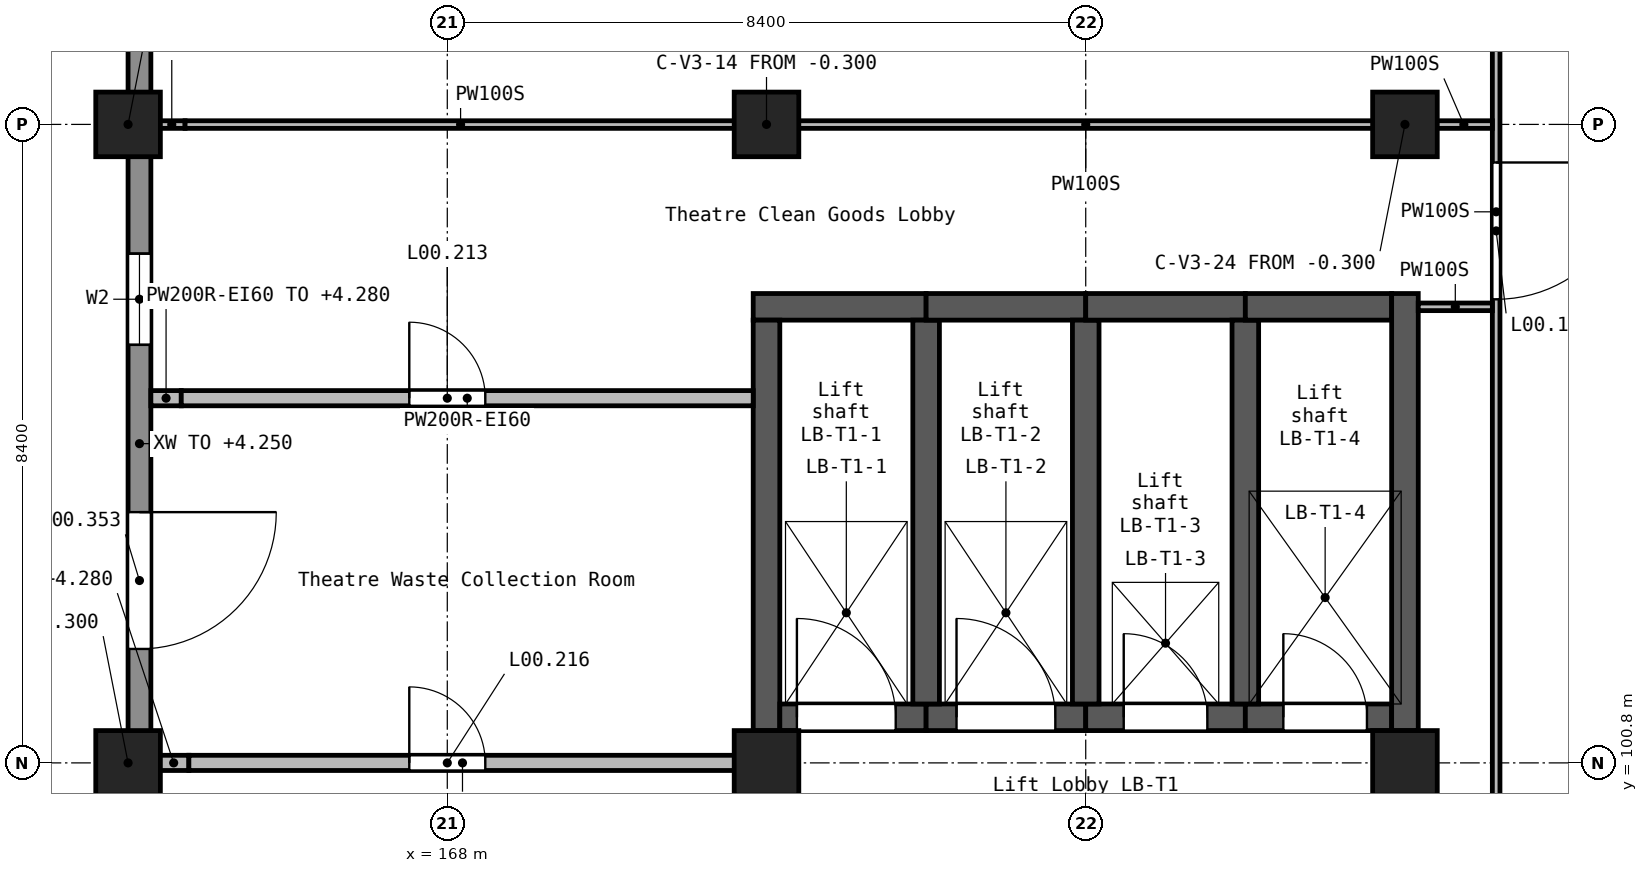
"""IFC4 building model, lengths in metres.
Left out: names, types, materials, properties, quantities, classifications, styles, units other than length and angle.
Written with IfcOpenShell. Run it as: python <this file> out.ifc"""

import sys

from ifc_helpers import new_model, si_unit, direction, frame, frame_2d, origin, origin_2d, place, context, subcontext, project, spatial, rectangle, extrude, element, fill, save


model = new_model("IFC4")
c1 = context("Model", 3, precision=1e-05, world=origin(), true_north=direction((0.0, 1.0)))
c2 = subcontext(c1, "Body", "Model", "MODEL_VIEW")
j1 = project(units=[si_unit("LENGTHUNIT", "METRE"), si_unit("PLANEANGLEUNIT", "RADIAN")], contexts=[c1])
p1 = place(None, origin())
s1 = spatial("IfcSite", under=j1, at=p1, CompositionType="ELEMENT")
p2 = place(p1, origin())
s2 = spatial("IfcBuilding", under=s1, at=p2, CompositionType="ELEMENT")
p3 = place(p2, origin())
s3 = spatial("IfcBuildingStorey", under=s2, at=p3, CompositionType="ELEMENT", Elevation=0.0)
for number, where, z_axis, x_axis in (
    (1, (163.8, 100.8, -0.3), (0.0, 0.0, 1.0), (1.0, 0.0, 0.0)),
    (2, (163.8, 109.2, -0.3), (0.0, 0.0, 1.0), (1.0, 0.0, 0.0)),
    (3, (172.2, 100.8, -0.3), (0.0, 0.0, 1.0), (1.0, 0.0, 0.0)),
    (4, (172.2, 109.2, -0.3), (0.0, 0.0, 1.0), (1.0, 0.0, 0.0)),
    (5, (180.6, 100.8, -0.3), (0.0, 0.0, 1.0), (1.0, 0.0, 0.0)),
    (6, (180.6, 109.2, -0.3), (0.0, 0.0, 1.0), (1.0, 0.0, 0.0)),
):
    element("IfcColumn", number, at=place(p3, frame(where, z_axis=z_axis, x_axis=x_axis)), inside=s3, PredefinedType="COLUMN", context=c2, shape_type="SweptSolid", body=[
        extrude(rectangle(XDim=0.85, YDim=0.85, at=origin_2d()), origin(), (0.0, 0.0, 1.0), 5.7),
    ])
p4 = place(p3, frame((172.025, 106.8, -0.3), z_axis=(0.0, 0.0, 1.0), x_axis=(1.0, 0.0, 0.0)))
e7 = element("IfcWall", 7, at=p4, inside=s3, PredefinedType="SHEAR", context=c2, shape_type="SweptSolid", body=[
    extrude(rectangle(XDim=2.275, YDim=0.35, at=frame_2d((1.138, 0.0))), origin(), (0.0, 0.0, 1.0), 5.7),
])
p5 = place(p3, frame((172.2, 101.225, -0.3), z_axis=(0.0, 0.0, 1.0), x_axis=(0.0, 1.0, 0.0)))
e8 = element("IfcWall", 8, at=p5, inside=s3, PredefinedType="SHEAR", context=c2, shape_type="SweptSolid", body=[
    extrude(rectangle(XDim=5.4, YDim=0.35, at=frame_2d((2.7, 0.0))), origin(), (0.0, 0.0, 1.0), 5.7),
])
p6 = place(p3, frame((172.375, 101.4, -0.3), z_axis=(0.0, 0.0, 1.0), x_axis=(1.0, 0.0, 0.0)))
e9 = element("IfcWall", 9, at=p6, inside=s3, PredefinedType="SHEAR", context=c2, shape_type="SweptSolid", body=[
    extrude(rectangle(XDim=1.925, YDim=0.35, at=frame_2d((0.962, 0.0))), origin(), (0.0, 0.0, 1.0), 5.7),
])
p7 = place(p6, frame((0.225, 0.0, 0.3)))
e10 = element("IfcOpeningElement", 10, at=p7, cuts=e9, PredefinedType="OPENING", context=c2, shape_type="SweptSolid", body=[
    extrude(rectangle(XDim=1.3, YDim=2.1, at=frame_2d((0.65, 1.05))), frame((0.0, 0.185, 0.0), z_axis=(0.0, -1.0, 0.0), x_axis=(1.0, 0.0, 0.0)), (0.0, 0.0, 1.0), 0.37),
])
p8 = place(p3, frame((174.3, 101.4, -0.3), z_axis=(0.0, 0.0, 1.0), x_axis=(1.0, 0.0, 0.0)))
e11 = element("IfcWall", 11, at=p8, inside=s3, PredefinedType="SHEAR", context=c2, shape_type="SweptSolid", body=[
    extrude(rectangle(XDim=2.1, YDim=0.35, at=frame_2d((1.05, 0.0))), origin(), (0.0, 0.0, 1.0), 5.7),
])
p9 = place(p8, frame((0.4, 0.0, 0.3)))
e12 = element("IfcOpeningElement", 12, at=p9, cuts=e11, PredefinedType="OPENING", context=c2, shape_type="SweptSolid", body=[
    extrude(rectangle(XDim=1.3, YDim=2.1, at=frame_2d((0.65, 1.05))), frame((0.0, 0.185, 0.0), z_axis=(0.0, -1.0, 0.0), x_axis=(1.0, 0.0, 0.0)), (0.0, 0.0, 1.0), 0.37),
])
p10 = place(p3, frame((174.3, 101.575, -0.3), z_axis=(0.0, 0.0, 1.0), x_axis=(0.0, 1.0, 0.0)))
e13 = element("IfcWall", 13, at=p10, inside=s3, PredefinedType="SHEAR", context=c2, shape_type="SweptSolid", body=[
    extrude(rectangle(XDim=5.05, YDim=0.35, at=frame_2d((2.525, 0.0))), origin(), (0.0, 0.0, 1.0), 5.7),
])
p11 = place(p3, frame((174.3, 106.8, -0.3), z_axis=(0.0, 0.0, 1.0), x_axis=(1.0, 0.0, 0.0)))
e14 = element("IfcWall", 14, at=p11, inside=s3, PredefinedType="SHEAR", context=c2, shape_type="SweptSolid", body=[
    extrude(rectangle(XDim=2.1, YDim=0.35, at=frame_2d((1.05, 0.0))), origin(), (0.0, 0.0, 1.0), 5.7),
])
p12 = place(p3, frame((176.4, 101.4, -0.3), z_axis=(0.0, 0.0, 1.0), x_axis=(1.0, 0.0, 0.0)))
e15 = element("IfcWall", 15, at=p12, inside=s3, PredefinedType="SHEAR", context=c2, shape_type="SweptSolid", body=[
    extrude(rectangle(XDim=2.1, YDim=0.35, at=frame_2d((1.05, 0.0))), origin(), (0.0, 0.0, 1.0), 5.7),
])
p13 = place(p12, frame((0.5, 0.0, 0.3)))
e16 = element("IfcOpeningElement", 16, at=p13, cuts=e15, PredefinedType="OPENING", context=c2, shape_type="SweptSolid", body=[
    extrude(rectangle(XDim=1.1, YDim=2.1, at=frame_2d((0.55, 1.05))), frame((0.0, 0.185, 0.0), z_axis=(0.0, -1.0, 0.0), x_axis=(1.0, 0.0, 0.0)), (0.0, 0.0, 1.0), 0.37),
])
p14 = place(p3, frame((176.4, 101.575, -0.3), z_axis=(0.0, 0.0, 1.0), x_axis=(0.0, 1.0, 0.0)))
e17 = element("IfcWall", 17, at=p14, inside=s3, PredefinedType="SHEAR", context=c2, shape_type="SweptSolid", body=[
    extrude(rectangle(XDim=5.05, YDim=0.35, at=frame_2d((2.525, 0.0))), origin(), (0.0, 0.0, 1.0), 5.7),
])
p15 = place(p3, frame((176.4, 106.8, -0.3), z_axis=(0.0, 0.0, 1.0), x_axis=(1.0, 0.0, 0.0)))
e18 = element("IfcWall", 18, at=p15, inside=s3, PredefinedType="SHEAR", context=c2, shape_type="SweptSolid", body=[
    extrude(rectangle(XDim=2.1, YDim=0.35, at=frame_2d((1.05, 0.0))), origin(), (0.0, 0.0, 1.0), 5.7),
])
p16 = place(p3, frame((178.5, 101.4, -0.3), z_axis=(0.0, 0.0, 1.0), x_axis=(1.0, 0.0, 0.0)))
e19 = element("IfcWall", 19, at=p16, inside=s3, PredefinedType="SHEAR", context=c2, shape_type="SweptSolid", body=[
    extrude(rectangle(XDim=1.925, YDim=0.35, at=frame_2d((0.962, 0.0))), origin(), (0.0, 0.0, 1.0), 5.7),
])
p17 = place(p16, frame((0.5, 0.0, 0.3)))
e20 = element("IfcOpeningElement", 20, at=p17, cuts=e19, PredefinedType="OPENING", context=c2, shape_type="SweptSolid", body=[
    extrude(rectangle(XDim=1.1, YDim=2.1, at=frame_2d((0.55, 1.05))), frame((0.0, 0.185, 0.0), z_axis=(0.0, -1.0, 0.0), x_axis=(1.0, 0.0, 0.0)), (0.0, 0.0, 1.0), 0.37),
])
p18 = place(p3, frame((178.5, 101.575, -0.3), z_axis=(0.0, 0.0, 1.0), x_axis=(0.0, 1.0, 0.0)))
e21 = element("IfcWall", 21, at=p18, inside=s3, PredefinedType="SHEAR", context=c2, shape_type="SweptSolid", body=[
    extrude(rectangle(XDim=5.05, YDim=0.35, at=frame_2d((2.525, 0.0))), origin(), (0.0, 0.0, 1.0), 5.7),
])
p19 = place(p3, frame((178.5, 106.8, -0.3), z_axis=(0.0, 0.0, 1.0), x_axis=(1.0, 0.0, 0.0)))
e22 = element("IfcWall", 22, at=p19, inside=s3, PredefinedType="SHEAR", context=c2, shape_type="SweptSolid", body=[
    extrude(rectangle(XDim=1.925, YDim=0.35, at=frame_2d((0.962, 0.0))), origin(), (0.0, 0.0, 1.0), 5.7),
])
p20 = place(p3, frame((180.6, 101.225, -0.3), z_axis=(0.0, 0.0, 1.0), x_axis=(0.0, 1.0, 0.0)))
e23 = element("IfcWall", 23, at=p20, inside=s3, PredefinedType="SHEAR", context=c2, shape_type="SweptSolid", body=[
    extrude(rectangle(XDim=5.75, YDim=0.35, at=frame_2d((2.875, 0.0))), origin(), (0.0, 0.0, 1.0), 5.7),
])
p21 = place(p3, frame((163.95, 117.54, 0.0), z_axis=(0.0, 0.0, 1.0), x_axis=(0.0, -1.0, 0.0)))
e24 = element("IfcWall", 24, at=p21, inside=s3, PredefinedType="STANDARD", context=c2, shape_type="SweptSolid", body=[
    extrude(rectangle(XDim=7.94, YDim=0.3, at=frame_2d((3.97, 0.0))), origin(), (0.0, 0.0, 1.0), 4.25),
])
p22 = place(p21, frame((1.385, 0.0, 1.2)))
e25 = element("IfcOpeningElement", 25, at=p22, cuts=e24, PredefinedType="OPENING", context=c2, shape_type="SweptSolid", body=[
    extrude(rectangle(XDim=1.2, YDim=1.2, at=frame_2d((0.6, 0.6))), frame((0.0, 0.16, 0.0), z_axis=(0.0, -1.0, 0.0), x_axis=(1.0, 0.0, 0.0)), (0.0, 0.0, 1.0), 0.32),
])
p23 = place(p21, frame((5.355, 0.0, 1.2)))
e26 = element("IfcOpeningElement", 26, at=p23, cuts=e24, PredefinedType="OPENING", context=c2, shape_type="SweptSolid", body=[
    extrude(rectangle(XDim=1.2, YDim=1.2, at=frame_2d((0.6, 0.6))), frame((0.0, 0.16, 0.0), z_axis=(0.0, -1.0, 0.0), x_axis=(1.0, 0.0, 0.0)), (0.0, 0.0, 1.0), 0.32),
])
p24 = place(p3, frame((163.95, 108.8, 0.0), z_axis=(0.0, 0.0, 1.0), x_axis=(0.0, -1.0, 0.0)))
e27 = element("IfcWall", 27, at=p24, inside=s3, PredefinedType="STANDARD", context=c2, shape_type="SweptSolid", body=[
    extrude(rectangle(XDim=7.6, YDim=0.3, at=frame_2d((3.8, 0.0))), origin(), (0.0, 0.0, 1.0), 4.25),
])
p25 = place(p24, frame((4.701, 0.0, 0.0)))
e28 = element("IfcOpeningElement", 28, at=p25, cuts=e27, PredefinedType="OPENING", context=c2, shape_type="SweptSolid", body=[
    extrude(rectangle(XDim=1.8, YDim=2.1, at=frame_2d((0.9, 1.05))), frame((0.0, 0.16, 0.0), z_axis=(0.0, -1.0, 0.0), x_axis=(1.0, 0.0, 0.0)), (0.0, 0.0, 1.0), 0.32),
])
p26 = place(p24, frame((1.3, 0.0, 1.2)))
e29 = element("IfcOpeningElement", 29, at=p26, cuts=e27, PredefinedType="OPENING", context=c2, shape_type="SweptSolid", body=[
    extrude(rectangle(XDim=1.2, YDim=1.2, at=frame_2d((0.6, 0.6))), frame((0.0, 0.16, 0.0), z_axis=(0.0, -1.0, 0.0), x_axis=(1.0, 0.0, 0.0)), (0.0, 0.0, 1.0), 0.32),
])
p27 = place(p3, frame((163.95, 100.4, 0.0), z_axis=(0.0, 0.0, 1.0), x_axis=(0.0, -1.0, 0.0)))
e30 = element("IfcWall", 30, at=p27, inside=s3, PredefinedType="STANDARD", context=c2, shape_type="SweptSolid", body=[
    extrude(rectangle(XDim=1.225, YDim=0.3, at=frame_2d((0.612, 0.0))), origin(), (0.0, 0.0, 1.0), 4.25),
])
p28 = place(p3, frame((164.2, 100.8, 0.0), z_axis=(0.0, 0.0, 1.0), x_axis=(1.0, 0.0, 0.0)))
e31 = element("IfcWall", 31, at=p28, inside=s3, PredefinedType="SOLIDWALL", context=c2, shape_type="SweptSolid", body=[
    extrude(rectangle(XDim=0.4, YDim=0.2, at=frame_2d((0.2, 0.0))), origin(), (0.0, 0.0, 1.0), 4.28),
])
p29 = place(p3, frame((164.6, 100.8, 0.0), z_axis=(0.0, 0.0, 1.0), x_axis=(1.0, 0.0, 0.0)))
e32 = element("IfcWall", 32, at=p29, inside=s3, PredefinedType="SOLIDWALL", context=c2, shape_type="SweptSolid", body=[
    extrude(rectangle(XDim=7.2, YDim=0.2, at=frame_2d((3.6, 0.0))), origin(), (0.0, 0.0, 1.0), 5.05),
])
p30 = place(p29, frame((2.9, 0.0, 0.0)))
e33 = element("IfcOpeningElement", 33, at=p30, cuts=e32, PredefinedType="OPENING", context=c2, shape_type="SweptSolid", body=[
    extrude(rectangle(XDim=1.0, YDim=2.1, at=frame_2d((0.5, 1.05))), frame((0.0, 0.11, 0.0), z_axis=(0.0, -1.0, 0.0), x_axis=(1.0, 0.0, 0.0)), (0.0, 0.0, 1.0), 0.22),
])
p31 = place(p3, frame((164.1, 105.598, 0.0), z_axis=(0.0, 0.0, 1.0), x_axis=(1.0, 0.0, 0.0)))
e34 = element("IfcWall", 34, at=p31, inside=s3, PredefinedType="SOLIDWALL", context=c2, shape_type="SweptSolid", body=[
    extrude(rectangle(XDim=0.4, YDim=0.2, at=frame_2d((0.2, 0.0))), origin(), (0.0, 0.0, 1.0), 4.28),
])
p32 = place(p3, frame((164.5, 105.598, 0.0), z_axis=(0.0, 0.0, 1.0), x_axis=(1.0, 0.0, 0.0)))
e35 = element("IfcWall", 35, at=p32, inside=s3, PredefinedType="SOLIDWALL", context=c2, shape_type="SweptSolid", body=[
    extrude(rectangle(XDim=7.525, YDim=0.2, at=frame_2d((3.762, 0.0))), origin(), (0.0, 0.0, 1.0), 5.05),
])
p33 = place(p32, frame((3.0, 0.0, 0.0)))
e36 = element("IfcOpeningElement", 36, at=p33, cuts=e35, PredefinedType="OPENING", context=c2, shape_type="SweptSolid", body=[
    extrude(rectangle(XDim=1.0, YDim=2.1, at=frame_2d((0.5, 1.05))), frame((0.0, 0.11, 0.0), z_axis=(0.0, -1.0, 0.0), x_axis=(1.0, 0.0, 0.0)), (0.0, 0.0, 1.0), 0.22),
])
p34 = place(p3, frame((181.8, 117.15, 0.0), z_axis=(0.0, 0.0, 1.0), x_axis=(0.0, -1.0, 0.0)))
e37 = element("IfcWall", 37, at=p34, inside=s3, PredefinedType="PARTITIONING", context=c2, shape_type="SweptSolid", body=[
    extrude(rectangle(XDim=18.2, YDim=0.1, at=frame_2d((9.1, 0.0))), origin(), (0.0, 0.0, 1.0), 5.05),
])
p35 = place(p34, frame((8.451, 0.0, 0.0)))
e38 = element("IfcOpeningElement", 38, at=p35, cuts=e37, PredefinedType="OPENING", context=c2, shape_type="SweptSolid", body=[
    extrude(rectangle(XDim=1.8, YDim=2.1, at=frame_2d((0.9, 1.05))), frame((0.0, 0.06, 0.0), z_axis=(0.0, -1.0, 0.0), x_axis=(1.0, 0.0, 0.0)), (0.0, 0.0, 1.0), 0.12),
])
p36 = place(p34, frame((5.102, 0.0, 0.0)))
e39 = element("IfcOpeningElement", 39, at=p36, cuts=e37, PredefinedType="OPENING", context=c2, shape_type="SweptSolid", body=[
    extrude(rectangle(XDim=0.9, YDim=2.1, at=frame_2d((0.45, 1.05))), frame((0.0, 0.06, 0.0), z_axis=(0.0, -1.0, 0.0), x_axis=(1.0, 0.0, 0.0)), (0.0, 0.0, 1.0), 0.12),
])
p37 = place(p34, frame((0.901, 0.0, 0.0)))
e40 = element("IfcOpeningElement", 40, at=p37, cuts=e37, PredefinedType="OPENING", context=c2, shape_type="SweptSolid", body=[
    extrude(rectangle(XDim=0.9, YDim=2.1, at=frame_2d((0.45, 1.05))), frame((0.0, 0.06, 0.0), z_axis=(0.0, -1.0, 0.0), x_axis=(1.0, 0.0, 0.0)), (0.0, 0.0, 1.0), 0.12),
])
p38 = place(p3, frame((164.2, 109.198, 0.0), z_axis=(0.0, 0.0, 1.0), x_axis=(1.0, 0.0, 0.0)))
e41 = element("IfcWall", 41, at=p38, inside=s3, PredefinedType="PARTITIONING", context=c2, shape_type="SweptSolid", body=[
    extrude(rectangle(XDim=0.35, YDim=0.1, at=frame_2d((0.175, 0.0))), origin(), (0.0, 0.0, 1.0), 4.28),
])
p39 = place(p3, frame((164.55, 109.198, 0.0), z_axis=(0.0, 0.0, 1.0), x_axis=(1.0, 0.0, 0.0)))
e42 = element("IfcWall", 42, at=p39, inside=s3, PredefinedType="PARTITIONING", context=c2, shape_type="SweptSolid", body=[
    extrude(rectangle(XDim=7.25, YDim=0.1, at=frame_2d((3.625, 0.0))), origin(), (0.0, 0.0, 1.0), 5.05),
])
p40 = place(p3, frame((172.6, 109.198, 0.0), z_axis=(0.0, 0.0, 1.0), x_axis=(1.0, 0.0, 0.0)))
e43 = element("IfcWall", 43, at=p40, inside=s3, PredefinedType="PARTITIONING", context=c2, shape_type="SweptSolid", body=[
    extrude(rectangle(XDim=7.6, YDim=0.1, at=frame_2d((3.8, 0.0))), origin(), (0.0, 0.0, 1.0), 5.05),
])
p41 = place(p3, frame((181.0, 109.198, 0.0), z_axis=(0.0, 0.0, 1.0), x_axis=(1.0, 0.0, 0.0)))
e44 = element("IfcWall", 44, at=p41, inside=s3, PredefinedType="PARTITIONING", context=c2, shape_type="SweptSolid", body=[
    extrude(rectangle(XDim=0.75, YDim=0.1, at=frame_2d((0.375, 0.0))), origin(), (0.0, 0.0, 1.0), 5.05),
])
p42 = place(p3, frame((180.775, 106.8, 0.0), z_axis=(0.0, 0.0, 1.0), x_axis=(1.0, 0.0, 0.0)))
e45 = element("IfcWall", 45, at=p42, inside=s3, PredefinedType="PARTITIONING", context=c2, shape_type="SweptSolid", body=[
    extrude(rectangle(XDim=0.975, YDim=0.1, at=frame_2d((0.488, 0.0))), origin(), (0.0, 0.0, 1.0), 5.05),
])
p43 = place(p25, frame((1.8, 0.0, 0.0), z_axis=(0.0, 0.0, 1.0), x_axis=(-1.0, 0.0, 0.0)))
e46 = element("IfcDoor", 46, at=p43, inside=s3, OperationType="SINGLE_SWING_LEFT", PredefinedType="DOOR", context=c2, shape_type="SweptSolid", body=[
    extrude(rectangle(XDim=1.8, YDim=2.1, at=frame_2d((0.9, 1.05))), frame((0.0, 0.025, 0.0), z_axis=(0.0, -1.0, 0.0), x_axis=(1.0, 0.0, 0.0)), (0.0, 0.0, 1.0), 0.05),
])
fill(e28, e46)
p44 = place(p26, origin())
e47 = element("IfcWindow", 47, at=p44, inside=s3, PartitioningType="SINGLE_PANEL", PredefinedType="WINDOW", context=c2, shape_type="SweptSolid", body=[
    extrude(rectangle(XDim=1.2, YDim=1.2, at=frame_2d((0.6, 0.6))), frame((0.0, 0.03, 0.0), z_axis=(0.0, -1.0, 0.0), x_axis=(1.0, 0.0, 0.0)), (0.0, 0.0, 1.0), 0.06),
])
fill(e29, e47)
p45 = place(p7, origin())
e48 = element("IfcDoor", 48, at=p45, inside=s3, OperationType="DOUBLE_DOOR_SLIDING", PredefinedType="DOOR", context=c2, shape_type="SweptSolid", body=[
    extrude(rectangle(XDim=1.3, YDim=2.1, at=frame_2d((0.65, 1.05))), frame((0.0, 0.025, 0.0), z_axis=(0.0, -1.0, 0.0), x_axis=(1.0, 0.0, 0.0)), (0.0, 0.0, 1.0), 0.05),
])
fill(e10, e48)
p46 = place(p9, origin())
e49 = element("IfcDoor", 49, at=p46, inside=s3, OperationType="DOUBLE_DOOR_SLIDING", PredefinedType="DOOR", context=c2, shape_type="SweptSolid", body=[
    extrude(rectangle(XDim=1.3, YDim=2.1, at=frame_2d((0.65, 1.05))), frame((0.0, 0.025, 0.0), z_axis=(0.0, -1.0, 0.0), x_axis=(1.0, 0.0, 0.0)), (0.0, 0.0, 1.0), 0.05),
])
fill(e12, e49)
p47 = place(p13, origin())
e50 = element("IfcDoor", 50, at=p47, inside=s3, OperationType="DOUBLE_DOOR_SLIDING", PredefinedType="DOOR", context=c2, shape_type="SweptSolid", body=[
    extrude(rectangle(XDim=1.1, YDim=2.1, at=frame_2d((0.55, 1.05))), frame((0.0, 0.025, 0.0), z_axis=(0.0, -1.0, 0.0), x_axis=(1.0, 0.0, 0.0)), (0.0, 0.0, 1.0), 0.05),
])
fill(e16, e50)
p48 = place(p17, origin())
e51 = element("IfcDoor", 51, at=p48, inside=s3, OperationType="DOUBLE_DOOR_SLIDING", PredefinedType="DOOR", context=c2, shape_type="SweptSolid", body=[
    extrude(rectangle(XDim=1.1, YDim=2.1, at=frame_2d((0.55, 1.05))), frame((0.0, 0.025, 0.0), z_axis=(0.0, -1.0, 0.0), x_axis=(1.0, 0.0, 0.0)), (0.0, 0.0, 1.0), 0.05),
])
fill(e20, e51)
p49 = place(p35, frame((1.8, 0.0, 0.0), z_axis=(0.0, 0.0, 1.0), x_axis=(-1.0, 0.0, 0.0)))
e52 = element("IfcDoor", 52, at=p49, inside=s3, OperationType="DOUBLE_DOOR_SINGLE_SWING", PredefinedType="DOOR", context=c2, shape_type="SweptSolid", body=[
    extrude(rectangle(XDim=1.8, YDim=2.1, at=frame_2d((0.9, 1.05))), frame((0.0, 0.025, 0.0), z_axis=(0.0, -1.0, 0.0), x_axis=(1.0, 0.0, 0.0)), (0.0, 0.0, 1.0), 0.05),
])
fill(e38, e52)
p50 = place(p33, frame((1.0, 0.0, 0.0), z_axis=(0.0, 0.0, 1.0), x_axis=(-1.0, 0.0, 0.0)))
e53 = element("IfcDoor", 53, at=p50, inside=s3, OperationType="SINGLE_SWING_RIGHT", PredefinedType="DOOR", context=c2, shape_type="SweptSolid", body=[
    extrude(rectangle(XDim=1.0, YDim=2.1, at=frame_2d((0.5, 1.05))), frame((0.0, 0.025, 0.0), z_axis=(0.0, -1.0, 0.0), x_axis=(1.0, 0.0, 0.0)), (0.0, 0.0, 1.0), 0.05),
])
fill(e36, e53)
p51 = place(p30, frame((1.0, 0.0, 0.0), z_axis=(0.0, 0.0, 1.0), x_axis=(-1.0, 0.0, 0.0)))
e54 = element("IfcDoor", 54, at=p51, inside=s3, OperationType="SINGLE_SWING_RIGHT", PredefinedType="DOOR", context=c2, shape_type="SweptSolid", body=[
    extrude(rectangle(XDim=1.0, YDim=2.1, at=frame_2d((0.5, 1.05))), frame((0.0, 0.025, 0.0), z_axis=(0.0, -1.0, 0.0), x_axis=(1.0, 0.0, 0.0)), (0.0, 0.0, 1.0), 0.05),
])
fill(e33, e54)
save(model, sys.argv[1])
